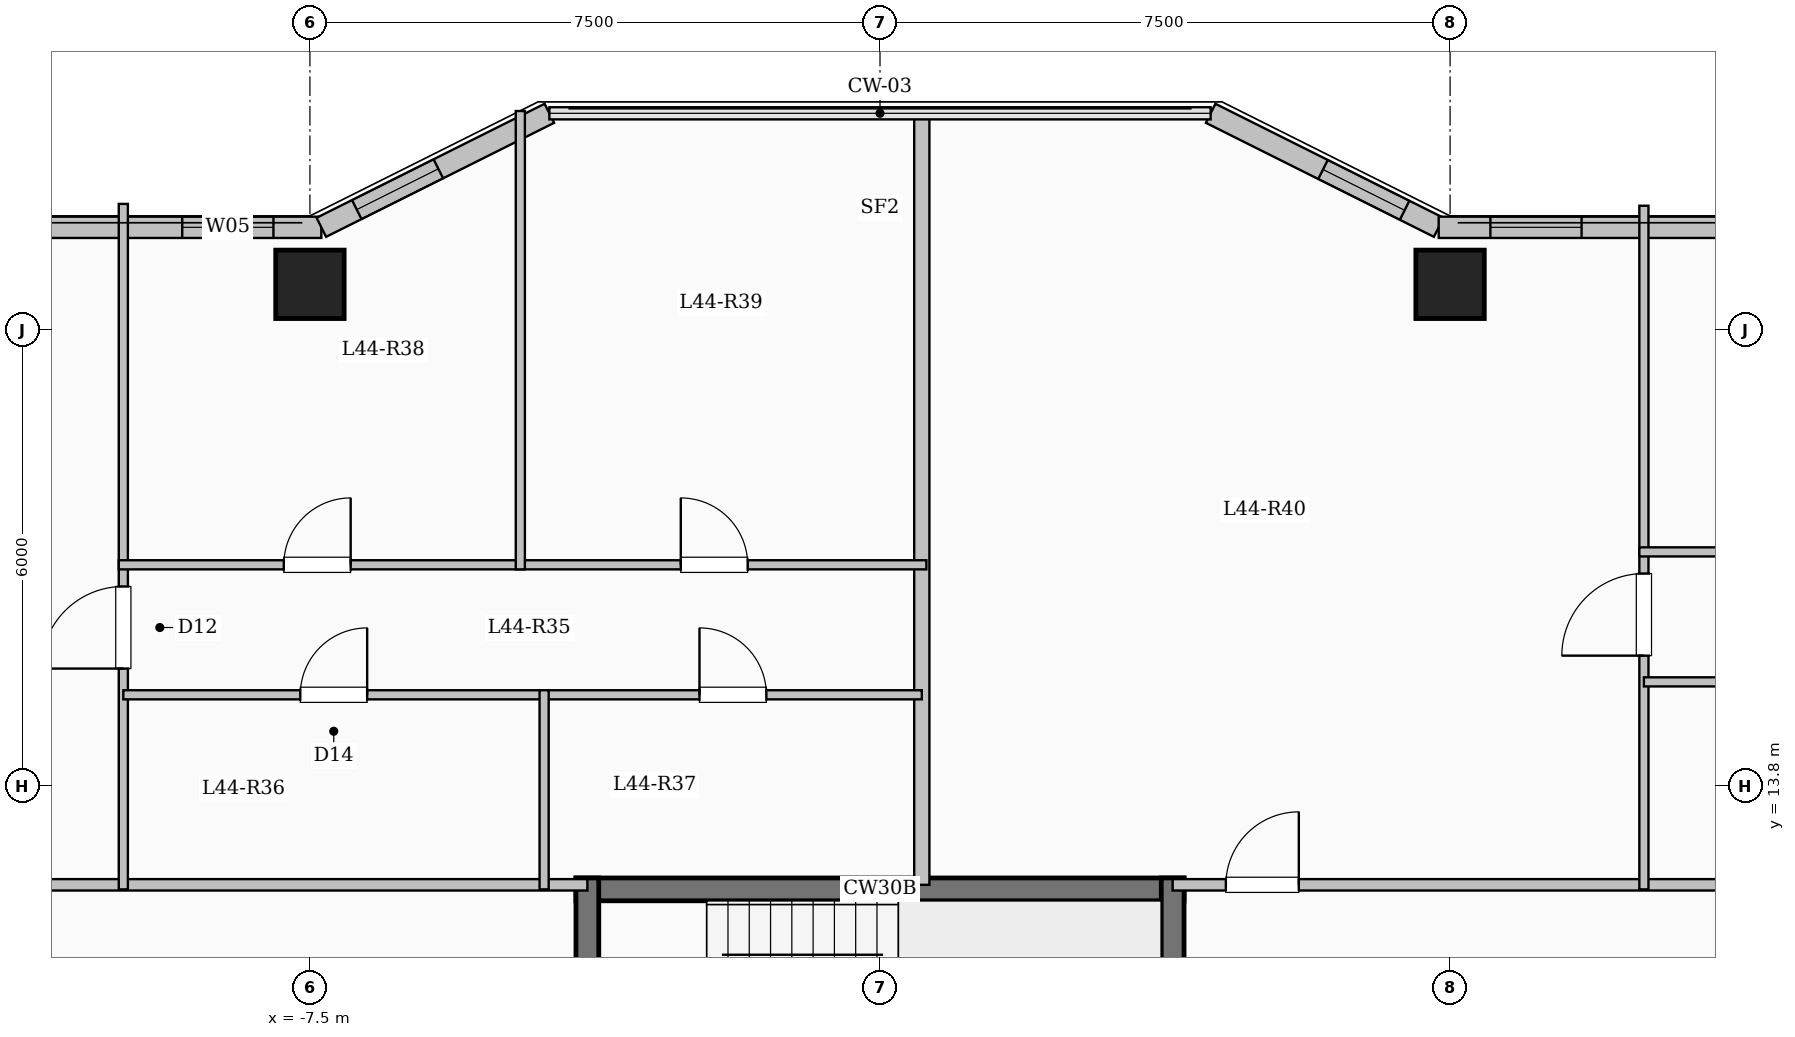
"""IFC4 building model, lengths in metres.
Left out: names, types, materials, properties, quantities, classifications, styles, units other than length and angle.
Written with IfcOpenShell. Run it as: python <this file> out.ifc"""

import sys

from ifc_helpers import new_model, si_unit, direction, frame, frame_2d, origin, origin_2d, place, context, subcontext, project, spatial, rectangle, extrude, element, fill, save


model = new_model("IFC4")
c1 = context("Model", 3, precision=1e-05, world=origin(), true_north=direction((0.0, 1.0)))
c2 = subcontext(c1, "Body", "Model", "MODEL_VIEW")
j1 = project(units=[si_unit("LENGTHUNIT", "METRE"), si_unit("PLANEANGLEUNIT", "RADIAN")], contexts=[c1])
p1 = place(None, origin())
s1 = spatial("IfcSite", under=j1, at=p1, CompositionType="ELEMENT")
p2 = place(p1, origin())
s2 = spatial("IfcBuilding", under=s1, at=p2, CompositionType="ELEMENT")
p3 = place(p2, frame((0.0, 0.0, 162.75)))
s3 = spatial("IfcBuildingStorey", under=s2, at=p3, CompositionType="ELEMENT", Elevation=162.75)
for number, where, z_axis, x_axis in (
    (1, (-7.5, 20.4, 0.0), (0.0, 0.0, 1.0), (1.0, 0.0, 0.0)),
    (2, (7.5, 20.4, 0.0), (0.0, 0.0, 1.0), (1.0, 0.0, 0.0)),
):
    element("IfcColumn", number, at=place(p3, frame(where, z_axis=z_axis, x_axis=x_axis)), inside=s3, PredefinedType="COLUMN", context=c2, shape_type="SweptSolid", body=[
        extrude(rectangle(XDim=0.9, YDim=0.9, at=origin_2d()), origin(), (0.0, 0.0, 1.0), 3.35),
    ])
p4 = place(p3, frame((-19.65, 21.15, 0.0), z_axis=(0.0, 0.0, 1.0), x_axis=(1.0, 0.0, 0.0)))
e3 = element("IfcWall", 3, at=p4, inside=s3, PredefinedType="SOLIDWALL", context=c2, shape_type="SweptSolid", body=[
    extrude(rectangle(XDim=12.3, YDim=0.28, at=frame_2d((6.15, 0.0))), origin(), (0.0, 0.0, 1.0), 3.1),
])
p5 = place(p4, frame((3.795, 0.0, 0.9)))
e4 = element("IfcOpeningElement", 4, at=p5, cuts=e3, PredefinedType="OPENING", context=c2, shape_type="SweptSolid", body=[
    extrude(rectangle(XDim=2.2, YDim=1.75, at=frame_2d((1.1, 0.875))), frame((0.0, 0.15, 0.0), z_axis=(0.0, -1.0, 0.0), x_axis=(1.0, 0.0, 0.0)), (0.0, 0.0, 1.0), 0.3),
])
p6 = place(p4, frame((10.47, 0.0, 0.95)))
e5 = element("IfcOpeningElement", 5, at=p6, cuts=e3, PredefinedType="OPENING", context=c2, shape_type="SweptSolid", body=[
    extrude(rectangle(XDim=1.2, YDim=1.5, at=frame_2d((0.6, 0.75))), frame((0.0, 0.15, 0.0), z_axis=(0.0, -1.0, 0.0), x_axis=(1.0, 0.0, 0.0)), (0.0, 0.0, 1.0), 0.3),
])
p7 = place(p3, frame((-7.35, 21.15, 0.0), z_axis=(0.0, 0.0, 1.0), x_axis=(0.894427191, 0.4472135955, 0.0)))
e6 = element("IfcWall", 6, at=p7, inside=s3, PredefinedType="SOLIDWALL", context=c2, shape_type="SweptSolid", body=[
    extrude(rectangle(XDim=3.354, YDim=0.28, at=frame_2d((1.677, 0.0))), origin(), (0.0, 0.0, 1.0), 3.1),
])
p8 = place(p7, frame((0.521, 0.0, 0.95)))
e7 = element("IfcOpeningElement", 7, at=p8, cuts=e6, PredefinedType="OPENING", context=c2, shape_type="SweptSolid", body=[
    extrude(rectangle(XDim=1.2, YDim=1.5, at=frame_2d((0.6, 0.75))), frame((0.0, 0.15, 0.0), z_axis=(0.0, -1.0, 0.0), x_axis=(1.0, 0.0, 0.0)), (0.0, 0.0, 1.0), 0.3),
])
p9 = place(p3, frame((4.35, 22.65, 0.0), z_axis=(0.0, 0.0, 1.0), x_axis=(0.894427191, -0.4472135955, 0.0)))
e8 = element("IfcWall", 8, at=p9, inside=s3, PredefinedType="SOLIDWALL", context=c2, shape_type="SweptSolid", body=[
    extrude(rectangle(XDim=3.354, YDim=0.28, at=frame_2d((1.677, 0.0))), origin(), (0.0, 0.0, 1.0), 3.1),
])
p10 = place(p9, frame((1.653, 0.0, 0.95)))
e9 = element("IfcOpeningElement", 9, at=p10, cuts=e8, PredefinedType="OPENING", context=c2, shape_type="SweptSolid", body=[
    extrude(rectangle(XDim=1.2, YDim=1.5, at=frame_2d((0.6, 0.75))), frame((0.0, 0.15, 0.0), z_axis=(0.0, -1.0, 0.0), x_axis=(1.0, 0.0, 0.0)), (0.0, 0.0, 1.0), 0.3),
])
p11 = place(p3, frame((7.35, 21.15, 0.0), z_axis=(0.0, 0.0, 1.0), x_axis=(1.0, 0.0, 0.0)))
e10 = element("IfcWall", 10, at=p11, inside=s3, PredefinedType="SOLIDWALL", context=c2, shape_type="SweptSolid", body=[
    extrude(rectangle(XDim=12.3, YDim=0.28, at=frame_2d((6.15, 0.0))), origin(), (0.0, 0.0, 1.0), 3.1),
])
p12 = place(p11, frame((0.68, 0.0, 0.95)))
e11 = element("IfcOpeningElement", 11, at=p12, cuts=e10, PredefinedType="OPENING", context=c2, shape_type="SweptSolid", body=[
    extrude(rectangle(XDim=1.2, YDim=1.5, at=frame_2d((0.6, 0.75))), frame((0.0, 0.15, 0.0), z_axis=(0.0, -1.0, 0.0), x_axis=(1.0, 0.0, 0.0)), (0.0, 0.0, 1.0), 0.3),
])
p13 = place(p11, frame((4.22, 0.0, 0.9)))
e12 = element("IfcOpeningElement", 12, at=p13, cuts=e10, PredefinedType="OPENING", context=c2, shape_type="SweptSolid", body=[
    extrude(rectangle(XDim=1.65, YDim=1.6, at=frame_2d((0.825, 0.8))), frame((0.0, 0.15, 0.0), z_axis=(0.0, -1.0, 0.0), x_axis=(1.0, 0.0, 0.0)), (0.0, 0.0, 1.0), 0.3),
])
p14 = place(p11, frame((8.99, 0.0, 0.9)))
e13 = element("IfcOpeningElement", 13, at=p14, cuts=e10, PredefinedType="OPENING", context=c2, shape_type="SweptSolid", body=[
    extrude(rectangle(XDim=1.65, YDim=1.6, at=frame_2d((0.825, 0.8))), frame((0.0, 0.15, 0.0), z_axis=(0.0, -1.0, 0.0), x_axis=(1.0, 0.0, 0.0)), (0.0, 0.0, 1.0), 0.3),
])
p15 = place(p3, frame((-4.0, 12.44, 0.0), z_axis=(0.0, 0.0, 1.0), x_axis=(1.0, 0.0, 0.0)))
e14 = element("IfcWall", 14, at=p15, inside=s3, PredefinedType="SHEAR", context=c2, shape_type="SweptSolid", body=[
    extrude(rectangle(XDim=8.0, YDim=0.3, at=frame_2d((4.0, 0.0))), origin(), (0.0, 0.0, 1.0), 3.35),
])
for number, where, z_axis, x_axis in (
    (15, (-3.85, 9.0, 0.0), (0.0, 0.0, 1.0), (0.0, 1.0, 0.0)),
    (16, (3.85, 9.0, 0.0), (0.0, 0.0, 1.0), (0.0, 1.0, 0.0)),
):
    element("IfcWall", number, at=place(p3, frame(where, z_axis=z_axis, x_axis=x_axis)), inside=s3, PredefinedType="SHEAR", context=c2, shape_type="SweptSolid", body=[
        extrude(rectangle(XDim=3.59, YDim=0.3, at=frame_2d((1.795, 0.0))), origin(), (0.0, 0.0, 1.0), 3.35),
    ])
p16 = place(p3, frame((-19.55, 12.5, 0.0), z_axis=(0.0, 0.0, 1.0), x_axis=(1.0, 0.0, 0.0)))
e17 = element("IfcWall", 17, at=p16, inside=s3, PredefinedType="PARTITIONING", context=c2, shape_type="SweptSolid", body=[
    extrude(rectangle(XDim=15.7, YDim=0.15, at=frame_2d((7.85, 0.0))), origin(), (0.0, 0.0, 1.0), 3.1),
])
p17 = place(p16, frame((0.7, 0.0, 0.0)))
e18 = element("IfcOpeningElement", 18, at=p17, cuts=e17, PredefinedType="OPENING", context=c2, shape_type="SweptSolid", body=[
    extrude(rectangle(XDim=0.96, YDim=2.15, at=frame_2d((0.48, 1.075))), frame((0.0, 0.085, 0.0), z_axis=(0.0, -1.0, 0.0), x_axis=(1.0, 0.0, 0.0)), (0.0, 0.0, 1.0), 0.17),
])
p18 = place(p3, frame((3.85, 12.5, 0.0), z_axis=(0.0, 0.0, 1.0), x_axis=(1.0, 0.0, 0.0)))
e19 = element("IfcWall", 19, at=p18, inside=s3, PredefinedType="PARTITIONING", context=c2, shape_type="SweptSolid", body=[
    extrude(rectangle(XDim=15.7, YDim=0.15, at=frame_2d((7.85, 0.0))), origin(), (0.0, 0.0, 1.0), 3.1),
])
p19 = place(p18, frame((0.7, 0.0, 0.0)))
e20 = element("IfcOpeningElement", 20, at=p19, cuts=e19, PredefinedType="OPENING", context=c2, shape_type="SweptSolid", body=[
    extrude(rectangle(XDim=0.96, YDim=2.15, at=frame_2d((0.48, 1.075))), frame((0.0, 0.085, 0.0), z_axis=(0.0, -1.0, 0.0), x_axis=(1.0, 0.0, 0.0)), (0.0, 0.0, 1.0), 0.17),
])
p20 = place(p3, frame((0.55, 12.5, 0.0), z_axis=(0.0, 0.0, 1.0), x_axis=(0.0, 1.0, 0.0)))
e21 = element("IfcWall", 21, at=p20, inside=s3, PredefinedType="SOLIDWALL", context=c2, shape_type="SweptSolid", body=[
    extrude(rectangle(XDim=10.18, YDim=0.2, at=frame_2d((5.09, 0.0))), origin(), (0.0, 0.0, 1.0), 3.1),
])
p21 = place(p3, frame((-9.955, 12.44, 0.0), z_axis=(0.0, 0.0, 1.0), x_axis=(0.0, 1.0, 0.0)))
e22 = element("IfcWall", 22, at=p21, inside=s3, PredefinedType="PARTITIONING", context=c2, shape_type="SweptSolid", body=[
    extrude(rectangle(XDim=9.018, YDim=0.12, at=frame_2d((4.509, 0.0))), origin(), (0.0, 0.0, 1.0), 3.1),
])
p22 = place(p21, frame((2.905, 0.0, 0.0)))
e23 = element("IfcOpeningElement", 23, at=p22, cuts=e22, PredefinedType="OPENING", context=c2, shape_type="SweptSolid", body=[
    extrude(rectangle(XDim=1.08, YDim=2.15, at=frame_2d((0.54, 1.075))), frame((0.0, 0.07, 0.0), z_axis=(0.0, -1.0, 0.0), x_axis=(1.0, 0.0, 0.0)), (0.0, 0.0, 1.0), 0.14),
])
p23 = place(p3, frame((-9.955, 15.0, 0.0), z_axis=(0.0, 0.0, 1.0), x_axis=(1.0, 0.0, 0.0)))
e24 = element("IfcWall", 24, at=p23, inside=s3, PredefinedType="PARTITIONING", context=c2, shape_type="SweptSolid", body=[
    extrude(rectangle(XDim=5.536, YDim=0.12, at=frame_2d((2.768, 0.0))), origin(), (0.0, 0.0, 1.0), 3.1),
])
p24 = place(p23, frame((2.328, 0.0, 0.0)))
e25 = element("IfcOpeningElement", 25, at=p24, cuts=e24, PredefinedType="OPENING", context=c2, shape_type="SweptSolid", body=[
    extrude(rectangle(XDim=0.88, YDim=2.1, at=frame_2d((0.44, 1.05))), frame((0.0, 0.07, 0.0), z_axis=(0.0, -1.0, 0.0), x_axis=(1.0, 0.0, 0.0)), (0.0, 0.0, 1.0), 0.14),
])
p25 = place(p3, frame((-4.419, 15.0, 0.0), z_axis=(0.0, 0.0, 1.0), x_axis=(1.0, 0.0, 0.0)))
e26 = element("IfcWall", 26, at=p25, inside=s3, PredefinedType="PARTITIONING", context=c2, shape_type="SweptSolid", body=[
    extrude(rectangle(XDim=4.969, YDim=0.12, at=frame_2d((2.484, 0.0))), origin(), (0.0, 0.0, 1.0), 3.1),
])
p26 = place(p25, frame((2.044, 0.0, 0.0)))
e27 = element("IfcOpeningElement", 27, at=p26, cuts=e26, PredefinedType="OPENING", context=c2, shape_type="SweptSolid", body=[
    extrude(rectangle(XDim=0.88, YDim=2.1, at=frame_2d((0.44, 1.05))), frame((0.0, 0.07, 0.0), z_axis=(0.0, -1.0, 0.0), x_axis=(1.0, 0.0, 0.0)), (0.0, 0.0, 1.0), 0.14),
])
p27 = place(p3, frame((-10.015, 16.71, 0.0), z_axis=(0.0, 0.0, 1.0), x_axis=(1.0, 0.0, 0.0)))
e28 = element("IfcWall", 28, at=p27, inside=s3, PredefinedType="PARTITIONING", context=c2, shape_type="SweptSolid", body=[
    extrude(rectangle(XDim=10.625, YDim=0.12, at=frame_2d((5.312, 0.0))), origin(), (0.0, 0.0, 1.0), 3.1),
])
p28 = place(p27, frame((2.171, 0.0, 0.0)))
e29 = element("IfcOpeningElement", 29, at=p28, cuts=e28, PredefinedType="OPENING", context=c2, shape_type="SweptSolid", body=[
    extrude(rectangle(XDim=0.88, YDim=2.1, at=frame_2d((0.44, 1.05))), frame((0.0, 0.07, 0.0), z_axis=(0.0, -1.0, 0.0), x_axis=(1.0, 0.0, 0.0)), (0.0, 0.0, 1.0), 0.14),
])
p29 = place(p27, frame((7.394, 0.0, 0.0)))
e30 = element("IfcOpeningElement", 30, at=p29, cuts=e28, PredefinedType="OPENING", context=c2, shape_type="SweptSolid", body=[
    extrude(rectangle(XDim=0.88, YDim=2.1, at=frame_2d((0.44, 1.05))), frame((0.0, 0.07, 0.0), z_axis=(0.0, -1.0, 0.0), x_axis=(1.0, 0.0, 0.0)), (0.0, 0.0, 1.0), 0.14),
])
p30 = place(p3, frame((-4.419, 12.44, 0.0), z_axis=(0.0, 0.0, 1.0), x_axis=(0.0, 1.0, 0.0)))
e31 = element("IfcWall", 31, at=p30, inside=s3, PredefinedType="PARTITIONING", context=c2, shape_type="SweptSolid", body=[
    extrude(rectangle(XDim=2.62, YDim=0.12, at=frame_2d((1.31, 0.0))), origin(), (0.0, 0.0, 1.0), 3.1),
])
p31 = place(p3, frame((-4.732, 16.65, 0.0), z_axis=(0.0, 0.0, 1.0), x_axis=(0.0, 1.0, 0.0)))
e32 = element("IfcWall", 32, at=p31, inside=s3, PredefinedType="PARTITIONING", context=c2, shape_type="SweptSolid", body=[
    extrude(rectangle(XDim=6.03, YDim=0.12, at=frame_2d((3.015, 0.0))), origin(), (0.0, 0.0, 1.0), 3.1),
])
p32 = place(p3, frame((10.05, 12.44, 0.0), z_axis=(0.0, 0.0, 1.0), x_axis=(0.0, 1.0, 0.0)))
e33 = element("IfcWall", 33, at=p32, inside=s3, PredefinedType="PARTITIONING", context=c2, shape_type="SweptSolid", body=[
    extrude(rectangle(XDim=8.994, YDim=0.12, at=frame_2d((4.497, 0.0))), origin(), (0.0, 0.0, 1.0), 3.1),
])
p33 = place(p32, frame((3.075, 0.0, 0.0)))
e34 = element("IfcOpeningElement", 34, at=p33, cuts=e33, PredefinedType="OPENING", context=c2, shape_type="SweptSolid", body=[
    extrude(rectangle(XDim=1.08, YDim=2.15, at=frame_2d((0.54, 1.075))), frame((0.0, 0.07, 0.0), z_axis=(0.0, -1.0, 0.0), x_axis=(1.0, 0.0, 0.0)), (0.0, 0.0, 1.0), 0.14),
])
p34 = place(p3, frame((10.05, 15.17, 0.0), z_axis=(0.0, 0.0, 1.0), x_axis=(1.0, 0.0, 0.0)))
e35 = element("IfcWall", 35, at=p34, inside=s3, PredefinedType="PARTITIONING", context=c2, shape_type="SweptSolid", body=[
    extrude(rectangle(XDim=5.381, YDim=0.12, at=frame_2d((2.69, 0.0))), origin(), (0.0, 0.0, 1.0), 3.1),
])
p35 = place(p34, frame((2.25, 0.0, 0.0)))
e36 = element("IfcOpeningElement", 36, at=p35, cuts=e35, PredefinedType="OPENING", context=c2, shape_type="SweptSolid", body=[
    extrude(rectangle(XDim=0.88, YDim=2.1, at=frame_2d((0.44, 1.05))), frame((0.0, 0.07, 0.0), z_axis=(0.0, -1.0, 0.0), x_axis=(1.0, 0.0, 0.0)), (0.0, 0.0, 1.0), 0.14),
])
p36 = place(p3, frame((9.99, 16.88, 0.0), z_axis=(0.0, 0.0, 1.0), x_axis=(1.0, 0.0, 0.0)))
e37 = element("IfcWall", 37, at=p36, inside=s3, PredefinedType="PARTITIONING", context=c2, shape_type="SweptSolid", body=[
    extrude(rectangle(XDim=9.62, YDim=0.12, at=frame_2d((4.81, 0.0))), origin(), (0.0, 0.0, 1.0), 2.685),
])
p37 = place(p36, frame((1.92, 0.0, 0.0)))
e38 = element("IfcOpeningElement", 38, at=p37, cuts=e37, PredefinedType="OPENING", context=c2, shape_type="SweptSolid", body=[
    extrude(rectangle(XDim=0.88, YDim=2.1, at=frame_2d((0.44, 1.05))), frame((0.0, 0.07, 0.0), z_axis=(0.0, -1.0, 0.0), x_axis=(1.0, 0.0, 0.0)), (0.0, 0.0, 1.0), 0.14),
])
p38 = place(p36, frame((6.64, 0.0, 0.0)))
e39 = element("IfcOpeningElement", 39, at=p38, cuts=e37, PredefinedType="OPENING", context=c2, shape_type="SweptSolid", body=[
    extrude(rectangle(XDim=0.88, YDim=2.1, at=frame_2d((0.44, 1.05))), frame((0.0, 0.07, 0.0), z_axis=(0.0, -1.0, 0.0), x_axis=(1.0, 0.0, 0.0)), (0.0, 0.0, 1.0), 0.14),
])
p39 = place(p6, origin())
e40 = element("IfcWindow", 40, at=p39, inside=s3, PartitioningType="SINGLE_PANEL", PredefinedType="WINDOW", context=c2, shape_type="SweptSolid", body=[
    extrude(rectangle(XDim=1.2, YDim=1.5, at=frame_2d((0.6, 0.75))), frame((0.0, 0.03, 0.0), z_axis=(0.0, -1.0, 0.0), x_axis=(1.0, 0.0, 0.0)), (0.0, 0.0, 1.0), 0.06),
])
fill(e5, e40)
p40 = place(p8, origin())
e41 = element("IfcWindow", 41, at=p40, inside=s3, PartitioningType="SINGLE_PANEL", PredefinedType="WINDOW", context=c2, shape_type="SweptSolid", body=[
    extrude(rectangle(XDim=1.2, YDim=1.5, at=frame_2d((0.6, 0.75))), frame((0.0, 0.03, 0.0), z_axis=(0.0, -1.0, 0.0), x_axis=(1.0, 0.0, 0.0)), (0.0, 0.0, 1.0), 0.06),
])
fill(e7, e41)
p41 = place(p10, origin())
e42 = element("IfcWindow", 42, at=p41, inside=s3, PartitioningType="SINGLE_PANEL", PredefinedType="WINDOW", context=c2, shape_type="SweptSolid", body=[
    extrude(rectangle(XDim=1.2, YDim=1.5, at=frame_2d((0.6, 0.75))), frame((0.0, 0.03, 0.0), z_axis=(0.0, -1.0, 0.0), x_axis=(1.0, 0.0, 0.0)), (0.0, 0.0, 1.0), 0.06),
])
fill(e9, e42)
p42 = place(p12, origin())
e43 = element("IfcWindow", 43, at=p42, inside=s3, PartitioningType="SINGLE_PANEL", PredefinedType="WINDOW", context=c2, shape_type="SweptSolid", body=[
    extrude(rectangle(XDim=1.2, YDim=1.5, at=frame_2d((0.6, 0.75))), frame((0.0, 0.03, 0.0), z_axis=(0.0, -1.0, 0.0), x_axis=(1.0, 0.0, 0.0)), (0.0, 0.0, 1.0), 0.06),
])
fill(e11, e43)
p43 = place(p22, origin())
e44 = element("IfcDoor", 44, at=p43, inside=s3, OperationType="SINGLE_SWING_LEFT", PredefinedType="DOOR", context=c2, shape_type="SweptSolid", body=[
    extrude(rectangle(XDim=1.08, YDim=2.15, at=frame_2d((0.54, 1.075))), frame((0.0, 0.025, 0.0), z_axis=(0.0, -1.0, 0.0), x_axis=(1.0, 0.0, 0.0)), (0.0, 0.0, 1.0), 0.05),
])
fill(e23, e44)
p44 = place(p24, origin())
e45 = element("IfcDoor", 45, at=p44, inside=s3, OperationType="SINGLE_SWING_RIGHT", PredefinedType="DOOR", context=c2, shape_type="SweptSolid", body=[
    extrude(rectangle(XDim=0.88, YDim=2.1, at=frame_2d((0.44, 1.05))), frame((0.0, 0.025, 0.0), z_axis=(0.0, -1.0, 0.0), x_axis=(1.0, 0.0, 0.0)), (0.0, 0.0, 1.0), 0.05),
])
fill(e25, e45)
p45 = place(p26, origin())
e46 = element("IfcDoor", 46, at=p45, inside=s3, OperationType="SINGLE_SWING_LEFT", PredefinedType="DOOR", context=c2, shape_type="SweptSolid", body=[
    extrude(rectangle(XDim=0.88, YDim=2.1, at=frame_2d((0.44, 1.05))), frame((0.0, 0.025, 0.0), z_axis=(0.0, -1.0, 0.0), x_axis=(1.0, 0.0, 0.0)), (0.0, 0.0, 1.0), 0.05),
])
fill(e27, e46)
p46 = place(p28, origin())
e47 = element("IfcDoor", 47, at=p46, inside=s3, OperationType="SINGLE_SWING_RIGHT", PredefinedType="DOOR", context=c2, shape_type="SweptSolid", body=[
    extrude(rectangle(XDim=0.88, YDim=2.1, at=frame_2d((0.44, 1.05))), frame((0.0, 0.025, 0.0), z_axis=(0.0, -1.0, 0.0), x_axis=(1.0, 0.0, 0.0)), (0.0, 0.0, 1.0), 0.05),
])
fill(e29, e47)
p47 = place(p29, origin())
e48 = element("IfcDoor", 48, at=p47, inside=s3, OperationType="SINGLE_SWING_LEFT", PredefinedType="DOOR", context=c2, shape_type="SweptSolid", body=[
    extrude(rectangle(XDim=0.88, YDim=2.1, at=frame_2d((0.44, 1.05))), frame((0.0, 0.025, 0.0), z_axis=(0.0, -1.0, 0.0), x_axis=(1.0, 0.0, 0.0)), (0.0, 0.0, 1.0), 0.05),
])
fill(e30, e48)
p48 = place(p19, origin())
e49 = element("IfcDoor", 49, at=p48, inside=s3, OperationType="SINGLE_SWING_RIGHT", PredefinedType="DOOR", context=c2, shape_type="SweptSolid", body=[
    extrude(rectangle(XDim=0.96, YDim=2.15, at=frame_2d((0.48, 1.075))), frame((0.0, 0.025, 0.0), z_axis=(0.0, -1.0, 0.0), x_axis=(1.0, 0.0, 0.0)), (0.0, 0.0, 1.0), 0.05),
])
fill(e20, e49)
p49 = place(p33, origin())
e50 = element("IfcDoor", 50, at=p49, inside=s3, OperationType="SINGLE_SWING_LEFT", PredefinedType="DOOR", context=c2, shape_type="SweptSolid", body=[
    extrude(rectangle(XDim=1.08, YDim=2.15, at=frame_2d((0.54, 1.075))), frame((0.0, 0.025, 0.0), z_axis=(0.0, -1.0, 0.0), x_axis=(1.0, 0.0, 0.0)), (0.0, 0.0, 1.0), 0.05),
])
fill(e34, e50)
save(model, sys.argv[1])
